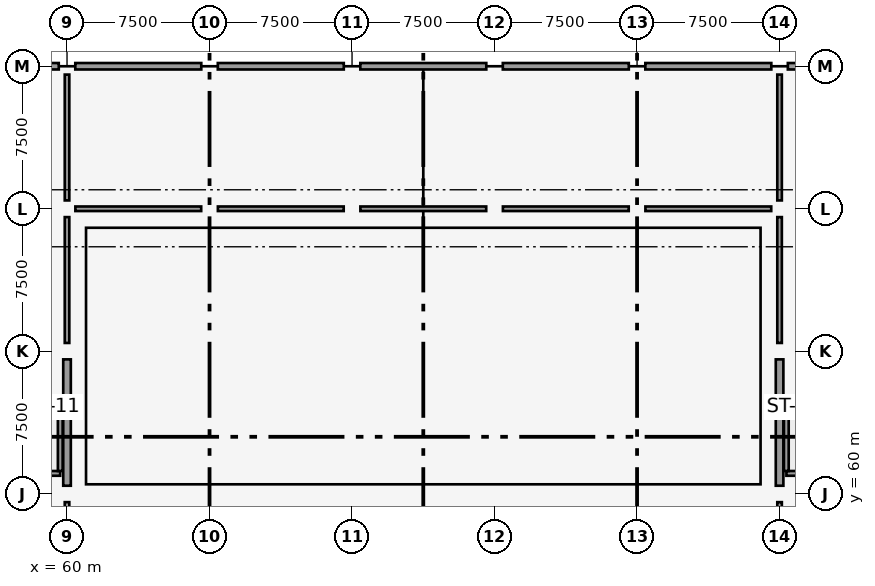
"""IFC4 building model, lengths in metres.
Left out: names, types, materials, properties, quantities, classifications, styles, units other than length and angle.
Written with IfcOpenShell. Run it as: python <this file> out.ifc"""

import sys

from ifc_helpers import new_model, si_unit, direction, frame, frame_2d, origin, origin_2d, place, context, subcontext, project, spatial, rectangle, extrude, element, fill, save


model = new_model("IFC4")
c1 = context("Model", 3, precision=1e-05, world=origin(), true_north=direction((0.0, 1.0)))
c2 = subcontext(c1, "Body", "Model", "MODEL_VIEW")
j1 = project(units=[si_unit("LENGTHUNIT", "METRE"), si_unit("PLANEANGLEUNIT", "RADIAN")], contexts=[c1])
p1 = place(None, origin())
s1 = spatial("IfcSite", under=j1, at=p1, CompositionType="ELEMENT")
p2 = place(p1, origin())
s2 = spatial("IfcBuilding", under=s1, at=p2, CompositionType="ELEMENT")
p3 = place(p2, frame((0.0, 0.0, 4.8)))
s3 = spatial("IfcBuildingStorey", under=s2, at=p3, CompositionType="ELEMENT", Elevation=4.8)
for number, where, z_axis, x_axis in (
    (1, (60.0, 60.0, 0.0), (0.0, 0.0, 1.0), (1.0, 0.0, 0.0)),
    (2, (60.0, 67.5, 0.0), (0.0, 0.0, 1.0), (1.0, 0.0, 0.0)),
    (3, (60.0, 75.0, 0.0), (0.0, 0.0, 1.0), (1.0, 0.0, 0.0)),
    (4, (60.0, 82.5, 0.0), (0.0, 0.0, 1.0), (1.0, 0.0, 0.0)),
    (5, (67.5, 75.0, 0.0), (0.0, 0.0, 1.0), (1.0, 0.0, 0.0)),
    (6, (67.5, 82.5, 0.0), (0.0, 0.0, 1.0), (1.0, 0.0, 0.0)),
    (7, (75.0, 75.0, 0.0), (0.0, 0.0, 1.0), (1.0, 0.0, 0.0)),
    (8, (75.0, 82.5, 0.0), (0.0, 0.0, 1.0), (1.0, 0.0, 0.0)),
    (9, (82.5, 75.0, 0.0), (0.0, 0.0, 1.0), (1.0, 0.0, 0.0)),
    (10, (82.5, 82.5, 0.0), (0.0, 0.0, 1.0), (1.0, 0.0, 0.0)),
    (11, (90.0, 75.0, 0.0), (0.0, 0.0, 1.0), (1.0, 0.0, 0.0)),
    (12, (90.0, 82.5, 0.0), (0.0, 0.0, 1.0), (1.0, 0.0, 0.0)),
    (13, (97.5, 60.0, 0.0), (0.0, 0.0, 1.0), (1.0, 0.0, 0.0)),
    (14, (97.5, 67.5, 0.0), (0.0, 0.0, 1.0), (1.0, 0.0, 0.0)),
    (15, (97.5, 75.0, 0.0), (0.0, 0.0, 1.0), (1.0, 0.0, 0.0)),
    (16, (97.5, 82.5, 0.0), (0.0, 0.0, 1.0), (1.0, 0.0, 0.0)),
):
    element("IfcColumn", number, at=place(p3, frame(where, z_axis=z_axis, x_axis=x_axis)), inside=s3, PredefinedType="COLUMN", context=c2, shape_type="SweptSolid", body=[
        extrude(rectangle(XDim=0.85, YDim=0.85, at=origin_2d()), origin(), (0.0, 0.0, 1.0), 4.2),
    ])
for number, where, z_axis, x_axis in (
    (17, (71.25, 82.5, 0.0), (0.0, 0.0, 1.0), (1.0, 0.0, 0.0)),
    (18, (86.25, 82.5, 0.0), (0.0, 0.0, 1.0), (1.0, 0.0, 0.0)),
):
    element("IfcColumn", number, at=place(p3, frame(where, z_axis=z_axis, x_axis=x_axis)), inside=s3, PredefinedType="PILASTER", context=c2, shape_type="SweptSolid", body=[
        extrude(rectangle(XDim=0.4, YDim=0.7, at=origin_2d()), origin(), (0.0, 0.0, 1.0), 4.2),
    ])
p4 = place(p3, frame((60.0, 60.425, 0.0), z_axis=(0.0, 0.0, 1.0), x_axis=(0.0, 1.0, 0.0)))
e19 = element("IfcWall", 19, at=p4, inside=s3, PredefinedType="SHEAR", context=c2, shape_type="SweptSolid", body=[
    extrude(rectangle(XDim=6.65, YDim=0.4, at=frame_2d((3.325, 0.0))), origin(), (0.0, 0.0, 1.0), 2.97),
])
p5 = place(p3, frame((97.5, 60.425, 0.0), z_axis=(0.0, 0.0, 1.0), x_axis=(0.0, 1.0, 0.0)))
e20 = element("IfcWall", 20, at=p5, inside=s3, PredefinedType="SHEAR", context=c2, shape_type="SweptSolid", body=[
    extrude(rectangle(XDim=6.65, YDim=0.4, at=frame_2d((3.325, 0.0))), origin(), (0.0, 0.0, 1.0), 2.87),
])
p6 = place(p3, frame((52.815, 82.5, 0.0), z_axis=(0.0, 0.0, 1.0), x_axis=(1.0, 0.0, 0.0)))
e21 = element("IfcWall", 21, at=p6, inside=s3, PredefinedType="SOLIDWALL", context=c2, shape_type="SweptSolid", body=[
    extrude(rectangle(XDim=6.75, YDim=0.34, at=frame_2d((3.375, 0.0))), origin(), (0.0, 0.0, 1.0), 3.14),
])
p7 = place(p6, frame((2.585, 0.0, 0.6)))
e22 = element("IfcOpeningElement", 22, at=p7, cuts=e21, PredefinedType="OPENING", context=c2, shape_type="SweptSolid", body=[
    extrude(rectangle(XDim=1.7, YDim=1.8, at=frame_2d((0.85, 0.9))), frame((0.0, 0.18, 0.0), z_axis=(0.0, -1.0, 0.0), x_axis=(1.0, 0.0, 0.0)), (0.0, 0.0, 1.0), 0.36),
])
p8 = place(p3, frame((60.435, 82.5, 0.0), z_axis=(0.0, 0.0, 1.0), x_axis=(1.0, 0.0, 0.0)))
e23 = element("IfcWall", 23, at=p8, inside=s3, PredefinedType="SOLIDWALL", context=c2, shape_type="SweptSolid", body=[
    extrude(rectangle(XDim=6.63, YDim=0.34, at=frame_2d((3.315, 0.0))), origin(), (0.0, 0.0, 1.0), 3.14),
])
p9 = place(p8, frame((2.39, 0.0, 0.6)))
e24 = element("IfcOpeningElement", 24, at=p9, cuts=e23, PredefinedType="OPENING", context=c2, shape_type="SweptSolid", body=[
    extrude(rectangle(XDim=1.85, YDim=1.8, at=frame_2d((0.925, 0.9))), frame((0.0, 0.18, 0.0), z_axis=(0.0, -1.0, 0.0), x_axis=(1.0, 0.0, 0.0)), (0.0, 0.0, 1.0), 0.36),
])
p10 = place(p3, frame((67.935, 82.5, 0.0), z_axis=(0.0, 0.0, 1.0), x_axis=(1.0, 0.0, 0.0)))
e25 = element("IfcWall", 25, at=p10, inside=s3, PredefinedType="SOLIDWALL", context=c2, shape_type="SweptSolid", body=[
    extrude(rectangle(XDim=6.63, YDim=0.34, at=frame_2d((3.315, 0.0))), origin(), (0.0, 0.0, 1.0), 3.14),
])
p11 = place(p3, frame((75.435, 82.5, 0.0), z_axis=(0.0, 0.0, 1.0), x_axis=(1.0, 0.0, 0.0)))
e26 = element("IfcWall", 26, at=p11, inside=s3, PredefinedType="SOLIDWALL", context=c2, shape_type="SweptSolid", body=[
    extrude(rectangle(XDim=6.63, YDim=0.34, at=frame_2d((3.315, 0.0))), origin(), (0.0, 0.0, 1.0), 3.14),
])
p12 = place(p11, frame((2.24, 0.0, 0.6)))
e27 = element("IfcOpeningElement", 27, at=p12, cuts=e26, PredefinedType="OPENING", context=c2, shape_type="SweptSolid", body=[
    extrude(rectangle(XDim=2.15, YDim=1.45, at=frame_2d((1.075, 0.725))), frame((0.0, 0.18, 0.0), z_axis=(0.0, -1.0, 0.0), x_axis=(1.0, 0.0, 0.0)), (0.0, 0.0, 1.0), 0.36),
])
p13 = place(p3, frame((82.935, 82.5, 0.0), z_axis=(0.0, 0.0, 1.0), x_axis=(1.0, 0.0, 0.0)))
e28 = element("IfcWall", 28, at=p13, inside=s3, PredefinedType="SOLIDWALL", context=c2, shape_type="SweptSolid", body=[
    extrude(rectangle(XDim=6.63, YDim=0.34, at=frame_2d((3.315, 0.0))), origin(), (0.0, 0.0, 1.0), 3.14),
])
p14 = place(p3, frame((90.435, 82.5, 0.0), z_axis=(0.0, 0.0, 1.0), x_axis=(1.0, 0.0, 0.0)))
e29 = element("IfcWall", 29, at=p14, inside=s3, PredefinedType="SOLIDWALL", context=c2, shape_type="SweptSolid", body=[
    extrude(rectangle(XDim=6.63, YDim=0.34, at=frame_2d((3.315, 0.0))), origin(), (0.0, 0.0, 1.0), 3.14),
])
p15 = place(p14, frame((2.665, 0.0, 0.6)))
e30 = element("IfcOpeningElement", 30, at=p15, cuts=e29, PredefinedType="OPENING", context=c2, shape_type="SweptSolid", body=[
    extrude(rectangle(XDim=1.3, YDim=1.3, at=frame_2d((0.65, 0.65))), frame((0.0, 0.18, 0.0), z_axis=(0.0, -1.0, 0.0), x_axis=(1.0, 0.0, 0.0)), (0.0, 0.0, 1.0), 0.36),
])
p16 = place(p3, frame((97.935, 82.5, 0.0), z_axis=(0.0, 0.0, 1.0), x_axis=(1.0, 0.0, 0.0)))
e31 = element("IfcWall", 31, at=p16, inside=s3, PredefinedType="SOLIDWALL", context=c2, shape_type="SweptSolid", body=[
    extrude(rectangle(XDim=6.76, YDim=0.34, at=frame_2d((3.38, 0.0))), origin(), (0.0, 0.0, 1.0), 3.14),
])
p17 = place(p16, frame((2.59, 0.0, 0.6)))
e32 = element("IfcOpeningElement", 32, at=p17, cuts=e31, PredefinedType="OPENING", context=c2, shape_type="SweptSolid", body=[
    extrude(rectangle(XDim=1.45, YDim=1.3, at=frame_2d((0.725, 0.65))), frame((0.0, 0.18, 0.0), z_axis=(0.0, -1.0, 0.0), x_axis=(1.0, 0.0, 0.0)), (0.0, 0.0, 1.0), 0.36),
])
p18 = place(p3, frame((52.38, 61.075, 0.0), z_axis=(0.0, 0.0, 1.0), x_axis=(1.0, 0.0, 0.0)))
e33 = element("IfcWall", 33, at=p18, inside=s3, PredefinedType="SOLIDWALL", context=c2, shape_type="SweptSolid", body=[
    extrude(rectangle(XDim=7.26, YDim=0.25, at=frame_2d((3.63, 0.0))), origin(), (0.0, 0.0, 1.0), 3.92),
])
p19 = place(p18, frame((0.62, 0.0, 0.0)))
e34 = element("IfcOpeningElement", 34, at=p19, cuts=e33, PredefinedType="OPENING", context=c2, shape_type="SweptSolid", body=[
    extrude(rectangle(XDim=1.1, YDim=2.15, at=frame_2d((0.55, 1.075))), frame((0.0, 0.135, 0.0), z_axis=(0.0, -1.0, 0.0), x_axis=(1.0, 0.0, 0.0)), (0.0, 0.0, 1.0), 0.27),
])
p20 = place(p3, frame((52.38, 64.885, 0.0), z_axis=(0.0, 0.0, 1.0), x_axis=(1.0, 0.0, 0.0)))
e35 = element("IfcWall", 35, at=p20, inside=s3, PredefinedType="SOLIDWALL", context=c2, shape_type="SweptSolid", body=[
    extrude(rectangle(XDim=7.26, YDim=0.25, at=frame_2d((3.63, 0.0))), origin(), (0.0, 0.0, 1.0), 3.92),
])
p21 = place(p20, frame((0.62, 0.0, 0.0)))
e36 = element("IfcOpeningElement", 36, at=p21, cuts=e35, PredefinedType="OPENING", context=c2, shape_type="SweptSolid", body=[
    extrude(rectangle(XDim=1.1, YDim=2.15, at=frame_2d((0.55, 1.075))), frame((0.0, 0.135, 0.0), z_axis=(0.0, -1.0, 0.0), x_axis=(1.0, 0.0, 0.0)), (0.0, 0.0, 1.0), 0.27),
])
p22 = place(p3, frame((59.645, 61.2, 0.0), z_axis=(0.0, 0.0, 1.0), x_axis=(0.0, 1.0, 0.0)))
e37 = element("IfcWall", 37, at=p22, inside=s3, PredefinedType="SOLIDWALL", context=c2, shape_type="SweptSolid", body=[
    extrude(rectangle(XDim=3.56, YDim=0.25, at=frame_2d((1.78, 0.0))), origin(), (0.0, 0.0, 1.0), 3.92),
])
p23 = place(p3, frame((97.86, 61.075, 0.0), z_axis=(0.0, 0.0, 1.0), x_axis=(1.0, 0.0, 0.0)))
e38 = element("IfcWall", 38, at=p23, inside=s3, PredefinedType="SOLIDWALL", context=c2, shape_type="SweptSolid", body=[
    extrude(rectangle(XDim=7.26, YDim=0.25, at=frame_2d((3.63, 0.0))), origin(), (0.0, 0.0, 1.0), 3.92),
])
p24 = place(p23, frame((5.54, 0.0, 0.0)))
e39 = element("IfcOpeningElement", 39, at=p24, cuts=e38, PredefinedType="OPENING", context=c2, shape_type="SweptSolid", body=[
    extrude(rectangle(XDim=1.1, YDim=2.15, at=frame_2d((0.55, 1.075))), frame((0.0, 0.135, 0.0), z_axis=(0.0, -1.0, 0.0), x_axis=(1.0, 0.0, 0.0)), (0.0, 0.0, 1.0), 0.27),
])
p25 = place(p3, frame((97.86, 64.885, 0.0), z_axis=(0.0, 0.0, 1.0), x_axis=(1.0, 0.0, 0.0)))
e40 = element("IfcWall", 40, at=p25, inside=s3, PredefinedType="SOLIDWALL", context=c2, shape_type="SweptSolid", body=[
    extrude(rectangle(XDim=7.26, YDim=0.25, at=frame_2d((3.63, 0.0))), origin(), (0.0, 0.0, 1.0), 3.92),
])
p26 = place(p25, frame((5.54, 0.0, 0.0)))
e41 = element("IfcOpeningElement", 41, at=p26, cuts=e40, PredefinedType="OPENING", context=c2, shape_type="SweptSolid", body=[
    extrude(rectangle(XDim=1.1, YDim=2.15, at=frame_2d((0.55, 1.075))), frame((0.0, 0.135, 0.0), z_axis=(0.0, -1.0, 0.0), x_axis=(1.0, 0.0, 0.0)), (0.0, 0.0, 1.0), 0.27),
])
p27 = place(p3, frame((97.855, 61.2, 0.0), z_axis=(0.0, 0.0, 1.0), x_axis=(0.0, 1.0, 0.0)))
e42 = element("IfcWall", 42, at=p27, inside=s3, PredefinedType="SOLIDWALL", context=c2, shape_type="SweptSolid", body=[
    extrude(rectangle(XDim=3.56, YDim=0.25, at=frame_2d((1.78, 0.0))), origin(), (0.0, 0.0, 1.0), 3.92),
])
p28 = place(p3, frame((60.439, 75.0, 0.0), z_axis=(0.0, 0.0, 1.0), x_axis=(1.0, 0.0, 0.0)))
e43 = element("IfcWall", 43, at=p28, inside=s3, PredefinedType="PARTITIONING", context=c2, shape_type="SweptSolid", body=[
    extrude(rectangle(XDim=6.622, YDim=0.24, at=frame_2d((3.311, 0.0))), origin(), (0.0, 0.0, 1.0), 2.84),
])
p29 = place(p28, frame((1.461, 0.0, 0.0)))
e44 = element("IfcOpeningElement", 44, at=p29, cuts=e43, PredefinedType="OPENING", context=c2, shape_type="SweptSolid", body=[
    extrude(rectangle(XDim=2.2, YDim=2.18, at=frame_2d((1.1, 1.09))), frame((0.0, 0.13, 0.0), z_axis=(0.0, -1.0, 0.0), x_axis=(1.0, 0.0, 0.0)), (0.0, 0.0, 1.0), 0.26),
])
for number, where, z_axis, x_axis in (
    (45, (67.939, 75.0, 0.0), (0.0, 0.0, 1.0), (1.0, 0.0, 0.0)),
    (46, (75.439, 75.0, 0.0), (0.0, 0.0, 1.0), (1.0, 0.0, 0.0)),
    (47, (82.939, 75.0, 0.0), (0.0, 0.0, 1.0), (1.0, 0.0, 0.0)),
):
    element("IfcWall", number, at=place(p3, frame(where, z_axis=z_axis, x_axis=x_axis)), inside=s3, PredefinedType="PARTITIONING", context=c2, shape_type="SweptSolid", body=[
        extrude(rectangle(XDim=6.622, YDim=0.24, at=frame_2d((3.311, 0.0))), origin(), (0.0, 0.0, 1.0), 2.84),
    ])
p30 = place(p3, frame((90.439, 75.0, 0.0), z_axis=(0.0, 0.0, 1.0), x_axis=(1.0, 0.0, 0.0)))
e48 = element("IfcWall", 48, at=p30, inside=s3, PredefinedType="PARTITIONING", context=c2, shape_type="SweptSolid", body=[
    extrude(rectangle(XDim=6.622, YDim=0.24, at=frame_2d((3.311, 0.0))), origin(), (0.0, 0.0, 1.0), 2.84),
])
p31 = place(p30, frame((2.961, 0.0, 0.0)))
e49 = element("IfcOpeningElement", 49, at=p31, cuts=e48, PredefinedType="OPENING", context=c2, shape_type="SweptSolid", body=[
    extrude(rectangle(XDim=2.2, YDim=2.18, at=frame_2d((1.1, 1.09))), frame((0.0, 0.13, 0.0), z_axis=(0.0, -1.0, 0.0), x_axis=(1.0, 0.0, 0.0)), (0.0, 0.0, 1.0), 0.26),
])
p32 = place(p3, frame((60.0, 52.939, 0.0), z_axis=(0.0, 0.0, 1.0), x_axis=(0.0, 1.0, 0.0)))
e50 = element("IfcWall", 50, at=p32, inside=s3, PredefinedType="PARTITIONING", context=c2, shape_type="SweptSolid", body=[
    extrude(rectangle(XDim=6.622, YDim=0.24, at=frame_2d((3.311, 0.0))), origin(), (0.0, 0.0, 1.0), 2.84),
])
p33 = place(p32, frame((2.411, 0.0, 0.0)))
e51 = element("IfcOpeningElement", 51, at=p33, cuts=e50, PredefinedType="OPENING", context=c2, shape_type="SweptSolid", body=[
    extrude(rectangle(XDim=1.8, YDim=2.16, at=frame_2d((0.9, 1.08))), frame((0.0, 0.13, 0.0), z_axis=(0.0, -1.0, 0.0), x_axis=(1.0, 0.0, 0.0)), (0.0, 0.0, 1.0), 0.26),
])
p34 = place(p3, frame((60.0, 67.939, 0.0), z_axis=(0.0, 0.0, 1.0), x_axis=(0.0, 1.0, 0.0)))
e52 = element("IfcWall", 52, at=p34, inside=s3, PredefinedType="PARTITIONING", context=c2, shape_type="SweptSolid", body=[
    extrude(rectangle(XDim=6.622, YDim=0.24, at=frame_2d((3.311, 0.0))), origin(), (0.0, 0.0, 1.0), 2.84),
])
p35 = place(p34, frame((2.411, 0.0, 0.0)))
e53 = element("IfcOpeningElement", 53, at=p35, cuts=e52, PredefinedType="OPENING", context=c2, shape_type="SweptSolid", body=[
    extrude(rectangle(XDim=1.8, YDim=2.16, at=frame_2d((0.9, 1.08))), frame((0.0, 0.13, 0.0), z_axis=(0.0, -1.0, 0.0), x_axis=(1.0, 0.0, 0.0)), (0.0, 0.0, 1.0), 0.26),
])
p36 = place(p3, frame((60.0, 75.439, 0.0), z_axis=(0.0, 0.0, 1.0), x_axis=(0.0, 1.0, 0.0)))
e54 = element("IfcWall", 54, at=p36, inside=s3, PredefinedType="PARTITIONING", context=c2, shape_type="SweptSolid", body=[
    extrude(rectangle(XDim=6.622, YDim=0.24, at=frame_2d((3.311, 0.0))), origin(), (0.0, 0.0, 1.0), 2.84),
])
p37 = place(p36, frame((2.511, 0.0, 0.0)))
e55 = element("IfcOpeningElement", 55, at=p37, cuts=e54, PredefinedType="OPENING", context=c2, shape_type="SweptSolid", body=[
    extrude(rectangle(XDim=1.6, YDim=2.15, at=frame_2d((0.8, 1.075))), frame((0.0, 0.13, 0.0), z_axis=(0.0, -1.0, 0.0), x_axis=(1.0, 0.0, 0.0)), (0.0, 0.0, 1.0), 0.26),
])
p38 = place(p3, frame((97.5, 52.939, 0.0), z_axis=(0.0, 0.0, 1.0), x_axis=(0.0, 1.0, 0.0)))
e56 = element("IfcWall", 56, at=p38, inside=s3, PredefinedType="PARTITIONING", context=c2, shape_type="SweptSolid", body=[
    extrude(rectangle(XDim=6.622, YDim=0.24, at=frame_2d((3.311, 0.0))), origin(), (0.0, 0.0, 1.0), 2.99),
])
p39 = place(p38, frame((2.411, 0.0, 0.0)))
e57 = element("IfcOpeningElement", 57, at=p39, cuts=e56, PredefinedType="OPENING", context=c2, shape_type="SweptSolid", body=[
    extrude(rectangle(XDim=1.8, YDim=2.16, at=frame_2d((0.9, 1.08))), frame((0.0, 0.13, 0.0), z_axis=(0.0, -1.0, 0.0), x_axis=(1.0, 0.0, 0.0)), (0.0, 0.0, 1.0), 0.26),
])
p40 = place(p3, frame((97.5, 67.939, 0.0), z_axis=(0.0, 0.0, 1.0), x_axis=(0.0, 1.0, 0.0)))
e58 = element("IfcWall", 58, at=p40, inside=s3, PredefinedType="PARTITIONING", context=c2, shape_type="SweptSolid", body=[
    extrude(rectangle(XDim=6.622, YDim=0.24, at=frame_2d((3.311, 0.0))), origin(), (0.0, 0.0, 1.0), 2.84),
])
p41 = place(p40, frame((2.411, 0.0, 0.0)))
e59 = element("IfcOpeningElement", 59, at=p41, cuts=e58, PredefinedType="OPENING", context=c2, shape_type="SweptSolid", body=[
    extrude(rectangle(XDim=1.8, YDim=2.16, at=frame_2d((0.9, 1.08))), frame((0.0, 0.13, 0.0), z_axis=(0.0, -1.0, 0.0), x_axis=(1.0, 0.0, 0.0)), (0.0, 0.0, 1.0), 0.26),
])
p42 = place(p3, frame((97.5, 75.439, 0.0), z_axis=(0.0, 0.0, 1.0), x_axis=(0.0, 1.0, 0.0)))
e60 = element("IfcWall", 60, at=p42, inside=s3, PredefinedType="PARTITIONING", context=c2, shape_type="SweptSolid", body=[
    extrude(rectangle(XDim=6.622, YDim=0.24, at=frame_2d((3.311, 0.0))), origin(), (0.0, 0.0, 1.0), 2.94),
])
p43 = place(p42, frame((2.511, 0.0, 0.0)))
e61 = element("IfcOpeningElement", 61, at=p43, cuts=e60, PredefinedType="OPENING", context=c2, shape_type="SweptSolid", body=[
    extrude(rectangle(XDim=1.6, YDim=2.15, at=frame_2d((0.8, 1.075))), frame((0.0, 0.13, 0.0), z_axis=(0.0, -1.0, 0.0), x_axis=(1.0, 0.0, 0.0)), (0.0, 0.0, 1.0), 0.26),
])
p44 = place(p9, origin())
e62 = element("IfcWindow", 62, at=p44, inside=s3, PartitioningType="SINGLE_PANEL", PredefinedType="WINDOW", context=c2, shape_type="SweptSolid", body=[
    extrude(rectangle(XDim=1.85, YDim=1.8, at=frame_2d((0.925, 0.9))), frame((0.0, 0.03, 0.0), z_axis=(0.0, -1.0, 0.0), x_axis=(1.0, 0.0, 0.0)), (0.0, 0.0, 1.0), 0.06),
])
fill(e24, e62)
p45 = place(p12, origin())
e63 = element("IfcWindow", 63, at=p45, inside=s3, PartitioningType="SINGLE_PANEL", PredefinedType="WINDOW", context=c2, shape_type="SweptSolid", body=[
    extrude(rectangle(XDim=2.15, YDim=1.45, at=frame_2d((1.075, 0.725))), frame((0.0, 0.03, 0.0), z_axis=(0.0, -1.0, 0.0), x_axis=(1.0, 0.0, 0.0)), (0.0, 0.0, 1.0), 0.06),
])
fill(e27, e63)
p46 = place(p15, origin())
e64 = element("IfcWindow", 64, at=p46, inside=s3, PartitioningType="SINGLE_PANEL", PredefinedType="WINDOW", context=c2, shape_type="SweptSolid", body=[
    extrude(rectangle(XDim=1.3, YDim=1.3, at=frame_2d((0.65, 0.65))), frame((0.0, 0.03, 0.0), z_axis=(0.0, -1.0, 0.0), x_axis=(1.0, 0.0, 0.0)), (0.0, 0.0, 1.0), 0.06),
])
fill(e30, e64)
p47 = place(p29, origin())
e65 = element("IfcDoor", 65, at=p47, inside=s3, OperationType="SINGLE_SWING_RIGHT", PredefinedType="DOOR", context=c2, shape_type="SweptSolid", body=[
    extrude(rectangle(XDim=2.2, YDim=2.18, at=frame_2d((1.1, 1.09))), frame((0.0, 0.025, 0.0), z_axis=(0.0, -1.0, 0.0), x_axis=(1.0, 0.0, 0.0)), (0.0, 0.0, 1.0), 0.05),
])
fill(e44, e65)
p48 = place(p31, origin())
e66 = element("IfcDoor", 66, at=p48, inside=s3, OperationType="SINGLE_SWING_LEFT", PredefinedType="DOOR", context=c2, shape_type="SweptSolid", body=[
    extrude(rectangle(XDim=2.2, YDim=2.18, at=frame_2d((1.1, 1.09))), frame((0.0, 0.025, 0.0), z_axis=(0.0, -1.0, 0.0), x_axis=(1.0, 0.0, 0.0)), (0.0, 0.0, 1.0), 0.05),
])
fill(e49, e66)
p49 = place(p35, origin())
e67 = element("IfcDoor", 67, at=p49, inside=s3, OperationType="SINGLE_SWING_LEFT", PredefinedType="DOOR", context=c2, shape_type="SweptSolid", body=[
    extrude(rectangle(XDim=1.8, YDim=2.16, at=frame_2d((0.9, 1.08))), frame((0.0, 0.025, 0.0), z_axis=(0.0, -1.0, 0.0), x_axis=(1.0, 0.0, 0.0)), (0.0, 0.0, 1.0), 0.05),
])
fill(e53, e67)
p50 = place(p37, origin())
e68 = element("IfcDoor", 68, at=p50, inside=s3, OperationType="SINGLE_SWING_RIGHT", PredefinedType="DOOR", context=c2, shape_type="SweptSolid", body=[
    extrude(rectangle(XDim=1.6, YDim=2.15, at=frame_2d((0.8, 1.075))), frame((0.0, 0.025, 0.0), z_axis=(0.0, -1.0, 0.0), x_axis=(1.0, 0.0, 0.0)), (0.0, 0.0, 1.0), 0.05),
])
fill(e55, e68)
p51 = place(p41, origin())
e69 = element("IfcDoor", 69, at=p51, inside=s3, OperationType="SINGLE_SWING_RIGHT", PredefinedType="DOOR", context=c2, shape_type="SweptSolid", body=[
    extrude(rectangle(XDim=1.8, YDim=2.16, at=frame_2d((0.9, 1.08))), frame((0.0, 0.025, 0.0), z_axis=(0.0, -1.0, 0.0), x_axis=(1.0, 0.0, 0.0)), (0.0, 0.0, 1.0), 0.05),
])
fill(e59, e69)
p52 = place(p43, origin())
e70 = element("IfcDoor", 70, at=p52, inside=s3, OperationType="SINGLE_SWING_LEFT", PredefinedType="DOOR", context=c2, shape_type="SweptSolid", body=[
    extrude(rectangle(XDim=1.6, YDim=2.15, at=frame_2d((0.8, 1.075))), frame((0.0, 0.025, 0.0), z_axis=(0.0, -1.0, 0.0), x_axis=(1.0, 0.0, 0.0)), (0.0, 0.0, 1.0), 0.05),
])
fill(e61, e70)
save(model, sys.argv[1])
